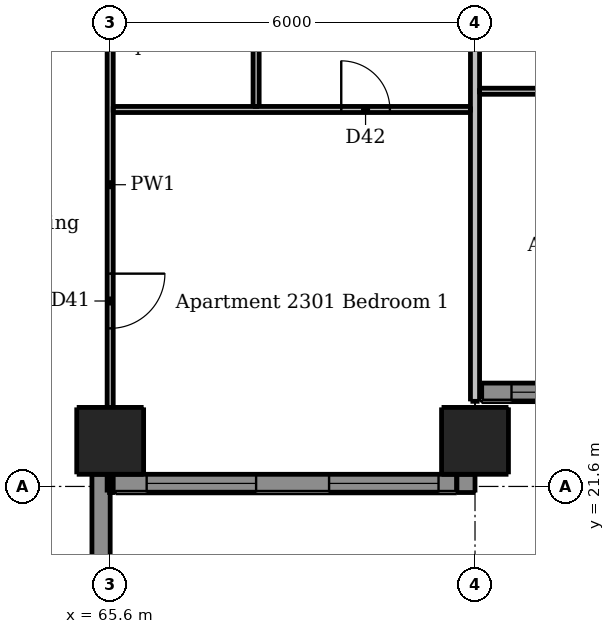
"""IFC4 building model, lengths in metres.
Left out: names, types, materials, properties, quantities, classifications, styles, units other than length and angle.
Written with IfcOpenShell. Run it as: python <this file> out.ifc"""

import sys

from ifc_helpers import new_model, si_unit, direction, frame, frame_2d, origin, origin_2d, place, context, subcontext, project, spatial, rectangle, extrude, element, fill, save


model = new_model("IFC4")
c1 = context("Model", 3, precision=1e-05, world=origin(), true_north=direction((0.0, 1.0)))
c2 = subcontext(c1, "Body", "Model", "MODEL_VIEW")
j1 = project(units=[si_unit("LENGTHUNIT", "METRE"), si_unit("PLANEANGLEUNIT", "RADIAN")], contexts=[c1])
p1 = place(None, origin())
s1 = spatial("IfcSite", under=j1, at=p1, CompositionType="ELEMENT")
p2 = place(p1, origin())
s2 = spatial("IfcBuilding", under=s1, at=p2, CompositionType="ELEMENT")
p3 = place(p2, frame((0.0, 0.0, 88.6)))
s3 = spatial("IfcBuildingStorey", under=s2, at=p3, CompositionType="ELEMENT", Elevation=88.6)
for number, where, z_axis, x_axis in (
    (1, (65.6, 22.35, 0.0), (0.0, 0.0, 1.0), (1.0, 0.0, 0.0)),
    (2, (71.6, 22.35, 0.0), (0.0, 0.0, 1.0), (1.0, 0.0, 0.0)),
):
    element("IfcColumn", number, at=place(p3, frame(where, z_axis=z_axis, x_axis=x_axis)), inside=s3, PredefinedType="COLUMN", context=c2, shape_type="SweptSolid", body=[
        extrude(rectangle(XDim=1.1, YDim=1.1, at=origin_2d()), origin(), (0.0, 0.0, 1.0), 3.05),
    ])
p4 = place(p3, frame((65.45, 20.0, 0.0), z_axis=(0.0, 0.0, 1.0), x_axis=(0.0, 1.0, 0.0)))
e3 = element("IfcWall", 3, at=p4, inside=s3, PredefinedType="SOLIDWALL", context=c2, shape_type="SweptSolid", body=[
    extrude(rectangle(XDim=1.8, YDim=0.3, at=frame_2d((0.9, 0.0))), origin(), (0.0, 0.0, 1.0), 3.05),
])
p5 = place(p3, frame((71.45, 21.5, 0.0), z_axis=(0.0, 0.0, 1.0), x_axis=(0.0, 1.0, 0.0)))
e4 = element("IfcWall", 4, at=p5, inside=s3, PredefinedType="SOLIDWALL", context=c2, shape_type="SweptSolid", body=[
    extrude(rectangle(XDim=0.3, YDim=0.3, at=frame_2d((0.15, 0.0))), origin(), (0.0, 0.0, 1.0), 3.05),
])
p6 = place(p3, frame((65.6, 21.65, 0.0), z_axis=(0.0, 0.0, 1.0), x_axis=(1.0, 0.0, 0.0)))
e5 = element("IfcWall", 5, at=p6, inside=s3, PredefinedType="SOLIDWALL", context=c2, shape_type="SweptSolid", body=[
    extrude(rectangle(XDim=5.7, YDim=0.3, at=frame_2d((2.85, 0.0))), origin(), (0.0, 0.0, 1.0), 3.05),
])
p7 = place(p6, frame((0.6, 0.0, 0.15)))
e6 = element("IfcOpeningElement", 6, at=p7, cuts=e5, PredefinedType="OPENING", context=c2, shape_type="SweptSolid", body=[
    extrude(rectangle(XDim=1.8, YDim=2.1, at=frame_2d((0.9, 1.05))), frame((0.0, 0.16, 0.0), z_axis=(0.0, -1.0, 0.0), x_axis=(1.0, 0.0, 0.0)), (0.0, 0.0, 1.0), 0.32),
])
p8 = place(p6, frame((3.6, 0.0, 0.15)))
e7 = element("IfcOpeningElement", 7, at=p8, cuts=e5, PredefinedType="OPENING", context=c2, shape_type="SweptSolid", body=[
    extrude(rectangle(XDim=1.8, YDim=2.1, at=frame_2d((0.9, 1.05))), frame((0.0, 0.16, 0.0), z_axis=(0.0, -1.0, 0.0), x_axis=(1.0, 0.0, 0.0)), (0.0, 0.0, 1.0), 0.32),
])
p9 = place(p3, frame((71.71, 23.15, 0.0), z_axis=(0.0, 0.0, 1.0), x_axis=(1.0, 0.0, 0.0)))
e8 = element("IfcWall", 8, at=p9, inside=s3, PredefinedType="SOLIDWALL", context=c2, shape_type="SweptSolid", body=[
    extrude(rectangle(XDim=5.78, YDim=0.3, at=frame_2d((2.89, 0.0))), origin(), (0.0, 0.0, 1.0), 3.05),
])
p10 = place(p9, frame((0.49, 0.0, 0.15)))
e9 = element("IfcOpeningElement", 9, at=p10, cuts=e8, PredefinedType="OPENING", context=c2, shape_type="SweptSolid", body=[
    extrude(rectangle(XDim=1.8, YDim=2.1, at=frame_2d((0.9, 1.05))), frame((0.0, 0.16, 0.0), z_axis=(0.0, -1.0, 0.0), x_axis=(1.0, 0.0, 0.0)), (0.0, 0.0, 1.0), 0.32),
])
p11 = place(p9, frame((3.49, 0.0, 0.15)))
e10 = element("IfcOpeningElement", 10, at=p11, cuts=e8, PredefinedType="OPENING", context=c2, shape_type="SweptSolid", body=[
    extrude(rectangle(XDim=1.8, YDim=2.1, at=frame_2d((0.9, 1.05))), frame((0.0, 0.16, 0.0), z_axis=(0.0, -1.0, 0.0), x_axis=(1.0, 0.0, 0.0)), (0.0, 0.0, 1.0), 0.32),
])
p12 = place(p3, frame((65.6, 31.625, 0.0), z_axis=(0.0, 0.0, 1.0), x_axis=(0.0, -1.0, 0.0)))
e11 = element("IfcWall", 11, at=p12, inside=s3, PredefinedType="PARTITIONING", context=c2, shape_type="SweptSolid", body=[
    extrude(rectangle(XDim=10.125, YDim=0.1, at=frame_2d((5.062, 0.0))), origin(), (0.0, 0.0, 1.0), 2.516),
])
p13 = place(p12, frame((1.425, 0.0, 0.0)))
e12 = element("IfcOpeningElement", 12, at=p13, cuts=e11, PredefinedType="OPENING", context=c2, shape_type="SweptSolid", body=[
    extrude(rectangle(XDim=0.9, YDim=2.1, at=frame_2d((0.45, 1.05))), frame((0.0, 0.06, 0.0), z_axis=(0.0, -1.0, 0.0), x_axis=(1.0, 0.0, 0.0)), (0.0, 0.0, 1.0), 0.12),
])
p14 = place(p12, frame((6.525, 0.0, 0.0)))
e13 = element("IfcOpeningElement", 13, at=p14, cuts=e11, PredefinedType="OPENING", context=c2, shape_type="SweptSolid", body=[
    extrude(rectangle(XDim=0.9, YDim=2.1, at=frame_2d((0.45, 1.05))), frame((0.0, 0.06, 0.0), z_axis=(0.0, -1.0, 0.0), x_axis=(1.0, 0.0, 0.0)), (0.0, 0.0, 1.0), 0.12),
])
p15 = place(p3, frame((68.0, 27.85, 0.0), z_axis=(0.0, 0.0, 1.0), x_axis=(0.0, 1.0, 0.0)))
e14 = element("IfcWall", 14, at=p15, inside=s3, PredefinedType="PARTITIONING", context=c2, shape_type="SweptSolid", body=[
    extrude(rectangle(XDim=3.775, YDim=0.1, at=frame_2d((1.887, 0.0))), origin(), (0.0, 0.0, 1.0), 3.05),
])
p16 = place(p3, frame((71.675, 28.1, 0.0), z_axis=(0.0, 0.0, 1.0), x_axis=(1.0, 0.0, 0.0)))
e15 = element("IfcWall", 15, at=p16, inside=s3, PredefinedType="PARTITIONING", context=c2, shape_type="SweptSolid", body=[
    extrude(rectangle(XDim=1.975, YDim=0.1, at=frame_2d((0.987, 0.0))), origin(), (0.0, 0.0, 1.0), 3.05),
])
p17 = place(p3, frame((65.65, 27.8, 0.0), z_axis=(0.0, 0.0, 1.0), x_axis=(1.0, 0.0, 0.0)))
e16 = element("IfcWall", 16, at=p17, inside=s3, PredefinedType="PARTITIONING", context=c2, shape_type="SweptSolid", body=[
    extrude(rectangle(XDim=5.875, YDim=0.1, at=frame_2d((2.938, 0.0))), origin(), (0.0, 0.0, 1.0), 3.05),
])
p18 = place(p17, frame((3.75, 0.0, 0.0)))
e17 = element("IfcOpeningElement", 17, at=p18, cuts=e16, PredefinedType="OPENING", context=c2, shape_type="SweptSolid", body=[
    extrude(rectangle(XDim=0.8, YDim=2.1, at=frame_2d((0.4, 1.05))), frame((0.0, 0.06, 0.0), z_axis=(0.0, -1.0, 0.0), x_axis=(1.0, 0.0, 0.0)), (0.0, 0.0, 1.0), 0.12),
])
p19 = place(p3, frame((71.6, 23.0, 0.0), z_axis=(0.0, 0.0, 1.0), x_axis=(0.0, 1.0, 0.0)))
e18 = element("IfcWall", 18, at=p19, inside=s3, PredefinedType="PARTITIONING", context=c2, shape_type="SweptSolid", body=[
    extrude(rectangle(XDim=8.625, YDim=0.15, at=frame_2d((4.312, 0.0))), origin(), (0.0, 0.0, 1.0), 2.516),
])
p20 = place(p7, origin())
e19 = element("IfcWindow", 19, at=p20, inside=s3, PartitioningType="DOUBLE_PANEL_VERTICAL", PredefinedType="WINDOW", context=c2, shape_type="SweptSolid", body=[
    extrude(rectangle(XDim=1.8, YDim=2.1, at=frame_2d((0.9, 1.05))), frame((0.0, 0.03, 0.0), z_axis=(0.0, -1.0, 0.0), x_axis=(1.0, 0.0, 0.0)), (0.0, 0.0, 1.0), 0.06),
])
fill(e6, e19)
p21 = place(p8, origin())
e20 = element("IfcWindow", 20, at=p21, inside=s3, PartitioningType="DOUBLE_PANEL_VERTICAL", PredefinedType="WINDOW", context=c2, shape_type="SweptSolid", body=[
    extrude(rectangle(XDim=1.8, YDim=2.1, at=frame_2d((0.9, 1.05))), frame((0.0, 0.03, 0.0), z_axis=(0.0, -1.0, 0.0), x_axis=(1.0, 0.0, 0.0)), (0.0, 0.0, 1.0), 0.06),
])
fill(e7, e20)
p22 = place(p10, origin())
e21 = element("IfcWindow", 21, at=p22, inside=s3, PartitioningType="DOUBLE_PANEL_VERTICAL", PredefinedType="WINDOW", context=c2, shape_type="SweptSolid", body=[
    extrude(rectangle(XDim=1.8, YDim=2.1, at=frame_2d((0.9, 1.05))), frame((0.0, 0.03, 0.0), z_axis=(0.0, -1.0, 0.0), x_axis=(1.0, 0.0, 0.0)), (0.0, 0.0, 1.0), 0.06),
])
fill(e9, e21)
p23 = place(p14, origin())
e22 = element("IfcDoor", 22, at=p23, inside=s3, OperationType="SINGLE_SWING_LEFT", PredefinedType="DOOR", context=c2, shape_type="SweptSolid", body=[
    extrude(rectangle(XDim=0.9, YDim=2.1, at=frame_2d((0.45, 1.05))), frame((0.0, 0.025, 0.0), z_axis=(0.0, -1.0, 0.0), x_axis=(1.0, 0.0, 0.0)), (0.0, 0.0, 1.0), 0.05),
])
fill(e13, e22)
p24 = place(p18, origin())
e23 = element("IfcDoor", 23, at=p24, inside=s3, OperationType="SINGLE_SWING_LEFT", PredefinedType="DOOR", context=c2, shape_type="SweptSolid", body=[
    extrude(rectangle(XDim=0.8, YDim=2.1, at=frame_2d((0.4, 1.05))), frame((0.0, 0.025, 0.0), z_axis=(0.0, -1.0, 0.0), x_axis=(1.0, 0.0, 0.0)), (0.0, 0.0, 1.0), 0.05),
])
fill(e17, e23)
save(model, sys.argv[1])
